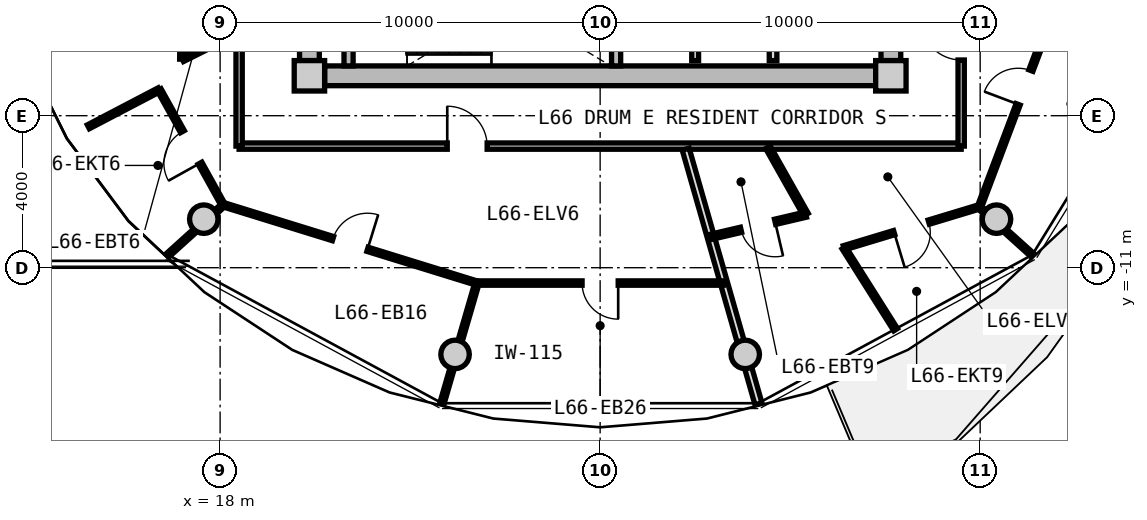
"""IFC4 building model, lengths in metres.
Left out: names, types, materials, properties, quantities, classifications, styles, units other than length and angle.
Written with IfcOpenShell. Run it as: python <this file> out.ifc"""

import sys

from ifc_helpers import new_model, si_unit, direction, frame, frame_2d, origin, origin_2d, place, context, subcontext, project, spatial, rectangle, circle, extrude, source, transform, mapped, element, fill, save


model = new_model("IFC4")
c1 = context("Model", 3, precision=1e-05, world=origin(), true_north=direction((0.0, 1.0)))
c2 = subcontext(c1, "Body", "Model", "MODEL_VIEW")
j1 = project(units=[si_unit("LENGTHUNIT", "METRE"), si_unit("PLANEANGLEUNIT", "RADIAN")], contexts=[c1])
p1 = place(None, origin())
s1 = spatial("IfcSite", under=j1, at=p1, CompositionType="ELEMENT")
p2 = place(p1, origin())
s2 = spatial("IfcBuilding", under=s1, at=p2, CompositionType="ELEMENT")
p3 = place(p2, frame((0.0, 0.0, 213.9)))
s3 = spatial("IfcBuildingStorey", under=s2, at=p3, CompositionType="ELEMENT", Elevation=213.9)
m1 = source(origin(), c2, "Body", "SweptSolid", [
    extrude(rectangle(XDim=0.8, YDim=0.8, at=origin_2d()), origin(), (0.0, 0.0, 1.0), 3.05),
])
for number, where, z_axis, x_axis in (
    (1, (20.35, -5.95, 0.0), (0.0, 0.0, 1.0), (1.0, 0.0, 0.0)),
    (2, (35.65, -5.95, 0.0), (0.0, 0.0, 1.0), (1.0, 0.0, 0.0)),
):
    element("IfcColumn", number, at=place(p3, frame(where, z_axis=z_axis, x_axis=x_axis)), inside=s3, PredefinedType="COLUMN", context=c2, shape_type="MappedRepresentation", body=[
        mapped(m1, transform((0.0, 0.0, 0.0), x_axis=(1.0, 0.0, 0.0), y_axis=(0.0, 1.0, 0.0), z_axis=(0.0, 0.0, 1.0), scale=1.0)),
    ])
m2 = source(origin(), c2, "Body", "SweptSolid", [
    extrude(rectangle(XDim=14.5, YDim=0.52, at=frame_2d((7.25, 0.0))), origin(), (0.0, 0.0, 1.0), 2.76),
])
p4 = place(p3, frame((35.25, -5.95, 0.0), z_axis=(0.0, 0.0, 1.0), x_axis=(-1.0, 0.0, 0.0)))
e3 = element("IfcWall", 3, at=p4, inside=s3, PredefinedType="SHEAR", context=c2, shape_type="MappedRepresentation", body=[
    mapped(m2, transform((0.0, 0.0, 0.0), x_axis=(1.0, 0.0, 0.0), y_axis=(0.0, 1.0, 0.0), z_axis=(0.0, 0.0, 1.0), scale=1.0)),
])
m3 = source(origin(), c2, "Body", "SweptSolid", [
    extrude(rectangle(XDim=11.1, YDim=0.52, at=frame_2d((5.55, 0.0))), origin(), (0.0, 0.0, 1.0), 2.76),
])
p5 = place(p3, frame((20.35, -5.55, 0.0), z_axis=(0.0, 0.0, 1.0), x_axis=(0.0, 1.0, 0.0)))
e4 = element("IfcWall", 4, at=p5, inside=s3, PredefinedType="SHEAR", context=c2, shape_type="MappedRepresentation", body=[
    mapped(m3, transform((0.0, 0.0, 0.0), x_axis=(1.0, 0.0, 0.0), y_axis=(0.0, 1.0, 0.0), z_axis=(0.0, 0.0, 1.0), scale=1.0)),
])
p6 = place(p5, frame((3.8, 0.0, 0.0)))
e5 = element("IfcOpeningElement", 5, at=p6, cuts=e4, PredefinedType="OPENING", context=c2, shape_type="SweptSolid", body=[
    extrude(rectangle(XDim=1.2, YDim=2.15, at=frame_2d((0.6, 1.075))), frame((0.0, 0.27, 0.0), z_axis=(0.0, -1.0, 0.0), x_axis=(1.0, 0.0, 0.0)), (0.0, 0.0, 1.0), 0.54),
])
p7 = place(p3, frame((35.65, 5.55, 0.0), z_axis=(0.0, 0.0, 1.0), x_axis=(0.0, -1.0, 0.0)))
e6 = element("IfcWall", 6, at=p7, inside=s3, PredefinedType="SHEAR", context=c2, shape_type="MappedRepresentation", body=[
    mapped(m3, transform((0.0, 0.0, 0.0), x_axis=(1.0, 0.0, 0.0), y_axis=(0.0, 1.0, 0.0), z_axis=(0.0, 0.0, 1.0), scale=1.0)),
])
p8 = place(p7, frame((5.65, 0.0, 0.0)))
e7 = element("IfcOpeningElement", 7, at=p8, cuts=e6, PredefinedType="OPENING", context=c2, shape_type="SweptSolid", body=[
    extrude(rectangle(XDim=1.2, YDim=2.15, at=frame_2d((0.6, 1.075))), frame((0.0, 0.27, 0.0), z_axis=(0.0, -1.0, 0.0), x_axis=(1.0, 0.0, 0.0)), (0.0, 0.0, 1.0), 0.54),
])
m4 = source(origin(), c2, "Body", "SweptSolid", [
    extrude(circle(Radius=0.375, at=origin_2d()), origin(), (0.0, 0.0, 1.0), 3.05),
])
for number, where, z_axis, x_axis in (
    (8, (17.57, -9.723, 0.0), (0.0, 0.0, 1.0), (1.0, 0.0, 0.0)),
    (9, (24.182, -13.281, 0.0), (0.0, 0.0, 1.0), (1.0, 0.0, 0.0)),
    (10, (31.818, -13.281, 0.0), (0.0, 0.0, 1.0), (1.0, 0.0, 0.0)),
    (11, (38.43, -9.723, 0.0), (0.0, 0.0, 1.0), (1.0, 0.0, 0.0)),
):
    element("IfcColumn", number, at=place(p3, frame(where, z_axis=z_axis, x_axis=x_axis)), inside=s3, PredefinedType="COLUMN", context=c2, shape_type="MappedRepresentation", body=[
        mapped(m4, transform((0.0, 0.0, 0.0), x_axis=(1.0, 0.0, 0.0), y_axis=(0.0, 1.0, 0.0), z_axis=(0.0, 0.0, 1.0), scale=1.0)),
    ])
m5 = source(origin(), c2, "Body", "SweptSolid", [
    extrude(rectangle(XDim=3.24, YDim=0.24, at=frame_2d((1.62, 0.0))), origin(), (0.0, 0.0, 1.0), 2.76),
])
for number, where, z_axis, x_axis in (
    (12, (21.38, -5.69, 0.0), (0.0, 0.0, 1.0), (0.0, 1.0, 0.0)),
    (13, (28.42, -5.69, 0.0), (0.0, 0.0, 1.0), (0.0, 1.0, 0.0)),
):
    element("IfcWall", number, at=place(p3, frame(where, z_axis=z_axis, x_axis=x_axis)), inside=s3, PredefinedType="PARTITIONING", context=c2, shape_type="MappedRepresentation", body=[
        mapped(m5, transform((0.0, 0.0, 0.0), x_axis=(1.0, 0.0, 0.0), y_axis=(0.0, 1.0, 0.0), z_axis=(0.0, 0.0, 1.0), scale=1.0)),
    ])
m6 = source(origin(), c2, "Body", "SweptSolid", [
    extrude(rectangle(XDim=3.8, YDim=0.2, at=frame_2d((1.9, 0.0))), origin(), (0.0, 0.0, 1.0), 2.745),
])
p9 = place(p3, frame((32.55, -5.55, 0.0), z_axis=(0.0, 0.0, 1.0), x_axis=(0.0, 1.0, 0.0)))
e14 = element("IfcWall", 14, at=p9, inside=s3, PredefinedType="PARTITIONING", context=c2, shape_type="MappedRepresentation", body=[
    mapped(m6, transform((0.0, 0.0, 0.0), x_axis=(1.0, 0.0, 0.0), y_axis=(0.0, 1.0, 0.0), z_axis=(0.0, 0.0, 1.0), scale=1.0)),
])
m7 = source(origin(), c2, "Body", "SweptSolid", [
    extrude(rectangle(XDim=4.2, YDim=0.18, at=frame_2d((2.1, 0.0))), origin(), (0.0, 0.0, 1.0), 2.745),
])
p10 = place(p3, frame((30.5, -5.55, 0.0), z_axis=(0.0, 0.0, 1.0), x_axis=(0.0, 1.0, 0.0)))
e15 = element("IfcWall", 15, at=p10, inside=s3, PredefinedType="PARTITIONING", context=c2, shape_type="MappedRepresentation", body=[
    mapped(m7, transform((0.0, 0.0, 0.0), x_axis=(1.0, 0.0, 0.0), y_axis=(0.0, 1.0, 0.0), z_axis=(0.0, 0.0, 1.0), scale=1.0)),
])
m8 = source(origin(), c2, "Body", "SweptSolid", [
    extrude(rectangle(XDim=19.0, YDim=0.165, at=frame_2d((9.5, 0.0))), origin(), (0.0, 0.0, 1.0), 2.745),
])
p11 = place(p3, frame((37.5, -7.8, 0.0), z_axis=(0.0, 0.0, 1.0), x_axis=(-1.0, 0.0, 0.0)))
e16 = element("IfcWall", 16, at=p11, inside=s3, PredefinedType="PARTITIONING", context=c2, shape_type="MappedRepresentation", body=[
    mapped(m8, transform((0.0, 0.0, 0.0), x_axis=(1.0, 0.0, 0.0), y_axis=(0.0, 1.0, 0.0), z_axis=(0.0, 0.0, 1.0), scale=1.0)),
])
p12 = place(p11, frame((12.473, 0.0, 0.0)))
e17 = element("IfcOpeningElement", 17, at=p12, cuts=e16, PredefinedType="OPENING", context=c2, shape_type="SweptSolid", body=[
    extrude(rectangle(XDim=1.05, YDim=2.15, at=frame_2d((0.525, 1.075))), frame((0.0, 0.093, 0.0), z_axis=(0.0, -1.0, 0.0), x_axis=(1.0, 0.0, 0.0)), (0.0, 0.0, 1.0), 0.185),
])
m9 = source(origin(), c2, "Body", "SweptSolid", [
    extrude(rectangle(XDim=6.88, YDim=0.165, at=frame_2d((3.44, 0.0))), origin(), (0.0, 0.0, 1.0), 2.745),
])
p13 = place(p3, frame((18.5, -7.8, 0.0), z_axis=(0.0, 0.0, 1.0), x_axis=(0.0, 1.0, 0.0)))
e18 = element("IfcWall", 18, at=p13, inside=s3, PredefinedType="PARTITIONING", context=c2, shape_type="MappedRepresentation", body=[
    mapped(m9, transform((0.0, 0.0, 0.0), x_axis=(1.0, 0.0, 0.0), y_axis=(0.0, 1.0, 0.0), z_axis=(0.0, 0.0, 1.0), scale=1.0)),
])
p14 = place(p3, frame((37.5, -0.92, 0.0), z_axis=(0.0, 0.0, 1.0), x_axis=(0.0, -1.0, 0.0)))
e19 = element("IfcWall", 19, at=p14, inside=s3, PredefinedType="PARTITIONING", context=c2, shape_type="MappedRepresentation", body=[
    mapped(m9, transform((0.0, 0.0, 0.0), x_axis=(1.0, 0.0, 0.0), y_axis=(0.0, 1.0, 0.0), z_axis=(0.0, 0.0, 1.0), scale=1.0)),
])
p15 = place(p14, frame((3.564, 0.0, 0.0)))
e20 = element("IfcOpeningElement", 20, at=p15, cuts=e19, PredefinedType="OPENING", context=c2, shape_type="SweptSolid", body=[
    extrude(rectangle(XDim=1.05, YDim=2.15, at=frame_2d((0.525, 1.075))), frame((0.0, 0.093, 0.0), z_axis=(0.0, -1.0, 0.0), x_axis=(1.0, 0.0, 0.0)), (0.0, 0.0, 1.0), 0.185),
])
m10 = source(origin(), c2, "Body", "SweptSolid", [
    extrude(rectangle(XDim=6.974, YDim=0.19, at=frame_2d((3.487, 0.0))), origin(), (0.0, 0.0, 1.0), 2.345),
])
p16 = place(p3, frame((30.251, -7.88, 0.0), z_axis=(0.0, 0.0, 1.0), x_axis=(0.274707256801, -0.961527910703, 0.0)))
e21 = element("IfcWall", 21, at=p16, inside=s3, PredefinedType="PARTITIONING", context=c2, shape_type="MappedRepresentation", body=[
    mapped(m10, transform((0.0, 0.0, 0.0), x_axis=(1.0, 0.0, 0.0), y_axis=(0.0, 1.0, 0.0), z_axis=(0.0, 0.0, 1.0), scale=1.0)),
])
m11 = source(origin(), c2, "Body", "SweptSolid", [
    extrude(rectangle(XDim=6.98, YDim=0.115, at=frame_2d((3.49, 0.0))), origin(), (0.0, 0.0, 1.0), 2.745),
])
p17 = place(p3, frame((18.091, -9.344, 0.0), z_axis=(0.0, 0.0, 1.0), x_axis=(0.955342331637, -0.295501318749, 0.0)))
e22 = element("IfcWall", 22, at=p17, inside=s3, PredefinedType="PARTITIONING", context=c2, shape_type="MappedRepresentation", body=[
    mapped(m11, transform((0.0, 0.0, 0.0), x_axis=(1.0, 0.0, 0.0), y_axis=(0.0, 1.0, 0.0), z_axis=(0.0, 0.0, 1.0), scale=1.0)),
])
p18 = place(p17, frame((3.015, 0.0, 0.0)))
e23 = element("IfcOpeningElement", 23, at=p18, cuts=e22, PredefinedType="OPENING", context=c2, shape_type="SweptSolid", body=[
    extrude(rectangle(XDim=0.95, YDim=2.1, at=frame_2d((0.475, 1.05))), frame((0.0, 0.067, 0.0), z_axis=(0.0, -1.0, 0.0), x_axis=(1.0, 0.0, 0.0)), (0.0, 0.0, 1.0), 0.135),
])
m12 = source(origin(), c2, "Body", "SweptSolid", [
    extrude(rectangle(XDim=1.988, YDim=0.115, at=frame_2d((0.994, 0.0))), origin(), (0.0, 0.0, 1.0), 2.345),
])
p19 = place(p3, frame((18.091, -9.344, 0.0), z_axis=(0.0, 0.0, 1.0), x_axis=(-0.741992301729, -0.670408401033, 0.0)))
e24 = element("IfcWall", 24, at=p19, inside=s3, PredefinedType="PARTITIONING", context=c2, shape_type="MappedRepresentation", body=[
    mapped(m12, transform((0.0, 0.0, 0.0), x_axis=(1.0, 0.0, 0.0), y_axis=(0.0, 1.0, 0.0), z_axis=(0.0, 0.0, 1.0), scale=1.0)),
])
m13 = source(origin(), c2, "Body", "SweptSolid", [
    extrude(rectangle(XDim=6.481, YDim=0.115, at=frame_2d((3.24, 0.0))), origin(), (0.0, 0.0, 1.0), 2.745),
])
p20 = place(p3, frame((24.76, -11.404, 0.0), z_axis=(0.0, 0.0, 1.0), x_axis=(1.0, 0.0, 0.0)))
e25 = element("IfcWall", 25, at=p20, inside=s3, PredefinedType="PARTITIONING", context=c2, shape_type="MappedRepresentation", body=[
    mapped(m13, transform((0.0, 0.0, 0.0), x_axis=(1.0, 0.0, 0.0), y_axis=(0.0, 1.0, 0.0), z_axis=(0.0, 0.0, 1.0), scale=1.0)),
])
p21 = place(p20, frame((2.765, 0.0, 0.0)))
e26 = element("IfcOpeningElement", 26, at=p21, cuts=e25, PredefinedType="OPENING", context=c2, shape_type="SweptSolid", body=[
    extrude(rectangle(XDim=0.95, YDim=2.1, at=frame_2d((0.475, 1.05))), frame((0.0, 0.067, 0.0), z_axis=(0.0, -1.0, 0.0), x_axis=(1.0, 0.0, 0.0)), (0.0, 0.0, 1.0), 0.135),
])
m14 = source(origin(), c2, "Body", "SweptSolid", [
    extrude(rectangle(XDim=3.313, YDim=0.115, at=frame_2d((1.657, 0.0))), origin(), (0.0, 0.0, 1.0), 2.345),
])
p22 = place(p3, frame((24.76, -11.404, 0.0), z_axis=(0.0, 0.0, 1.0), x_axis=(-0.279612365916, -0.960112975033, 0.0)))
e27 = element("IfcWall", 27, at=p22, inside=s3, PredefinedType="PARTITIONING", context=c2, shape_type="MappedRepresentation", body=[
    mapped(m14, transform((0.0, 0.0, 0.0), x_axis=(1.0, 0.0, 0.0), y_axis=(0.0, 1.0, 0.0), z_axis=(0.0, 0.0, 1.0), scale=1.0)),
])
m15 = source(origin(), c2, "Body", "SweptSolid", [
    extrude(rectangle(XDim=1.638, YDim=0.14, at=frame_2d((0.819, 0.0))), origin(), (0.0, 0.0, 1.0), 2.745),
])
p23 = place(p3, frame((18.47, -4.778, 0.0), z_axis=(0.0, 0.0, 1.0), x_axis=(-0.893919977945, -0.448226586707, 0.0)))
e28 = element("IfcWall", 28, at=p23, inside=s3, PredefinedType="PARTITIONING", context=c2, shape_type="MappedRepresentation", body=[
    mapped(m15, transform((0.0, 0.0, 0.0), x_axis=(1.0, 0.0, 0.0), y_axis=(0.0, 1.0, 0.0), z_axis=(0.0, 0.0, 1.0), scale=1.0)),
])
m16 = source(origin(), c2, "Body", "SweptSolid", [
    extrude(rectangle(XDim=2.759, YDim=0.14, at=frame_2d((1.379, 0.0))), origin(), (0.0, 0.0, 1.0), 2.745),
])
p24 = place(p3, frame((17.005, -5.513, 0.0), z_axis=(0.0, 0.0, 1.0), x_axis=(0.01194710728, 0.999928630767, 0.0)))
e29 = element("IfcWall", 29, at=p24, inside=s3, PredefinedType="PARTITIONING", context=c2, shape_type="MappedRepresentation", body=[
    mapped(m16, transform((0.0, 0.0, 0.0), x_axis=(1.0, 0.0, 0.0), y_axis=(0.0, 1.0, 0.0), z_axis=(0.0, 0.0, 1.0), scale=1.0)),
])
p25 = place(p24, frame((0.919, 0.0, 0.0)))
e30 = element("IfcOpeningElement", 30, at=p25, cuts=e29, PredefinedType="OPENING", context=c2, shape_type="SweptSolid", body=[
    extrude(rectangle(XDim=0.92, YDim=2.1, at=frame_2d((0.46, 1.05))), frame((0.0, 0.08, 0.0), z_axis=(0.0, -1.0, 0.0), x_axis=(1.0, 0.0, 0.0)), (0.0, 0.0, 1.0), 0.16),
])
m17 = source(origin(), c2, "Body", "SweptSolid", [
    extrude(rectangle(XDim=2.104, YDim=0.115, at=frame_2d((1.052, 0.0))), origin(), (0.0, 0.0, 1.0), 2.745),
])
p26 = place(p3, frame((16.396, -6.317, 0.0), z_axis=(0.0, 0.0, 1.0), x_axis=(-0.886060817493, -0.463569010724, 0.0)))
e31 = element("IfcWall", 31, at=p26, inside=s3, PredefinedType="PARTITIONING", context=c2, shape_type="MappedRepresentation", body=[
    mapped(m17, transform((0.0, 0.0, 0.0), x_axis=(1.0, 0.0, 0.0), y_axis=(0.0, 1.0, 0.0), z_axis=(0.0, 0.0, 1.0), scale=1.0)),
])
m18 = source(origin(), c2, "Body", "SweptSolid", [
    extrude(rectangle(XDim=3.472, YDim=0.115, at=frame_2d((1.736, 0.0))), origin(), (0.0, 0.0, 1.0), 2.745),
])
p27 = place(p3, frame((16.396, -6.317, 0.0), z_axis=(0.0, 0.0, 1.0), x_axis=(0.485804139346, -0.874067696574, 0.0)))
e32 = element("IfcWall", 32, at=p27, inside=s3, PredefinedType="PARTITIONING", context=c2, shape_type="MappedRepresentation", body=[
    mapped(m18, transform((0.0, 0.0, 0.0), x_axis=(1.0, 0.0, 0.0), y_axis=(0.0, 1.0, 0.0), z_axis=(0.0, 0.0, 1.0), scale=1.0)),
])
p28 = place(p27, frame((1.261, 0.0, 0.0)))
e33 = element("IfcOpeningElement", 33, at=p28, cuts=e32, PredefinedType="OPENING", context=c2, shape_type="SweptSolid", body=[
    extrude(rectangle(XDim=0.95, YDim=2.1, at=frame_2d((0.475, 1.05))), frame((0.0, 0.067, 0.0), z_axis=(0.0, -1.0, 0.0), x_axis=(1.0, 0.0, 0.0)), (0.0, 0.0, 1.0), 0.135),
])
m19 = source(origin(), c2, "Body", "SweptSolid", [
    extrude(rectangle(XDim=6.738, YDim=0.115, at=frame_2d((3.369, 0.0))), origin(), (0.0, 0.0, 1.0), 2.745),
])
p29 = place(p3, frame((37.978, -9.409, 0.0), z_axis=(0.0, 0.0, 1.0), x_axis=(0.352945344347, 0.935643940772, 0.0)))
e34 = element("IfcWall", 34, at=p29, inside=s3, PredefinedType="PARTITIONING", context=c2, shape_type="MappedRepresentation", body=[
    mapped(m19, transform((0.0, 0.0, 0.0), x_axis=(1.0, 0.0, 0.0), y_axis=(0.0, 1.0, 0.0), z_axis=(0.0, 0.0, 1.0), scale=1.0)),
])
p30 = place(p29, frame((2.894, 0.0, 0.0)))
e35 = element("IfcOpeningElement", 35, at=p30, cuts=e34, PredefinedType="OPENING", context=c2, shape_type="SweptSolid", body=[
    extrude(rectangle(XDim=0.95, YDim=2.1, at=frame_2d((0.475, 1.05))), frame((0.0, 0.067, 0.0), z_axis=(0.0, -1.0, 0.0), x_axis=(1.0, 0.0, 0.0)), (0.0, 0.0, 1.0), 0.135),
])
m20 = source(origin(), c2, "Body", "SweptSolid", [
    extrude(rectangle(XDim=1.894, YDim=0.115, at=frame_2d((0.947, 0.0))), origin(), (0.0, 0.0, 1.0), 2.345),
])
p31 = place(p3, frame((37.978, -9.409, 0.0), z_axis=(0.0, 0.0, 1.0), x_axis=(0.742704207382, -0.669619638554, 0.0)))
e36 = element("IfcWall", 36, at=p31, inside=s3, PredefinedType="PARTITIONING", context=c2, shape_type="MappedRepresentation", body=[
    mapped(m20, transform((0.0, 0.0, 0.0), x_axis=(1.0, 0.0, 0.0), y_axis=(0.0, 1.0, 0.0), z_axis=(0.0, 0.0, 1.0), scale=1.0)),
])
m21 = source(origin(), c2, "Body", "SweptSolid", [
    extrude(rectangle(XDim=2.035, YDim=0.14, at=frame_2d((1.018, 0.0))), origin(), (0.0, 0.0, 1.0), 2.745),
])
p32 = place(p3, frame((32.415, -7.83, 0.0), z_axis=(0.0, 0.0, 1.0), x_axis=(0.491092509169, -0.871107425888, 0.0)))
e37 = element("IfcWall", 37, at=p32, inside=s3, PredefinedType="PARTITIONING", context=c2, shape_type="MappedRepresentation", body=[
    mapped(m21, transform((0.0, 0.0, 0.0), x_axis=(1.0, 0.0, 0.0), y_axis=(0.0, 1.0, 0.0), z_axis=(0.0, 0.0, 1.0), scale=1.0)),
])
m22 = source(origin(), c2, "Body", "SweptSolid", [
    extrude(rectangle(XDim=2.586, YDim=0.14, at=frame_2d((1.293, 0.0))), origin(), (0.0, 0.0, 1.0), 2.745),
])
p33 = place(p3, frame((33.415, -9.603, 0.0), z_axis=(0.0, 0.0, 1.0), x_axis=(-0.973691298219, -0.227871138526, 0.0)))
e38 = element("IfcWall", 38, at=p33, inside=s3, PredefinedType="PARTITIONING", context=c2, shape_type="MappedRepresentation", body=[
    mapped(m22, transform((0.0, 0.0, 0.0), x_axis=(1.0, 0.0, 0.0), y_axis=(0.0, 1.0, 0.0), z_axis=(0.0, 0.0, 1.0), scale=1.0)),
])
p34 = place(p33, frame((0.833, 0.0, 0.0)))
e39 = element("IfcOpeningElement", 39, at=p34, cuts=e38, PredefinedType="OPENING", context=c2, shape_type="SweptSolid", body=[
    extrude(rectangle(XDim=0.92, YDim=2.1, at=frame_2d((0.46, 1.05))), frame((0.0, 0.08, 0.0), z_axis=(0.0, -1.0, 0.0), x_axis=(1.0, 0.0, 0.0)), (0.0, 0.0, 1.0), 0.16),
])
m23 = source(origin(), c2, "Body", "SweptSolid", [
    extrude(rectangle(XDim=2.549, YDim=0.115, at=frame_2d((1.274, 0.0))), origin(), (0.0, 0.0, 1.0), 2.745),
])
p35 = place(p3, frame((34.414, -10.477, 0.0), z_axis=(0.0, 0.0, 1.0), x_axis=(0.534108310175, -0.845416059111, 0.0)))
e40 = element("IfcWall", 40, at=p35, inside=s3, PredefinedType="PARTITIONING", context=c2, shape_type="MappedRepresentation", body=[
    mapped(m23, transform((0.0, 0.0, 0.0), x_axis=(1.0, 0.0, 0.0), y_axis=(0.0, 1.0, 0.0), z_axis=(0.0, 0.0, 1.0), scale=1.0)),
])
m24 = source(origin(), c2, "Body", "SweptSolid", [
    extrude(rectangle(XDim=3.714, YDim=0.115, at=frame_2d((1.857, 0.0))), origin(), (0.0, 0.0, 1.0), 2.745),
])
p36 = place(p3, frame((34.414, -10.477, 0.0), z_axis=(0.0, 0.0, 1.0), x_axis=(0.957188983281, 0.28946372879, 0.0)))
e41 = element("IfcWall", 41, at=p36, inside=s3, PredefinedType="PARTITIONING", context=c2, shape_type="MappedRepresentation", body=[
    mapped(m24, transform((0.0, 0.0, 0.0), x_axis=(1.0, 0.0, 0.0), y_axis=(0.0, 1.0, 0.0), z_axis=(0.0, 0.0, 1.0), scale=1.0)),
])
p37 = place(p36, frame((1.382, 0.0, 0.0)))
e42 = element("IfcOpeningElement", 42, at=p37, cuts=e41, PredefinedType="OPENING", context=c2, shape_type="SweptSolid", body=[
    extrude(rectangle(XDim=0.95, YDim=2.1, at=frame_2d((0.475, 1.05))), frame((0.0, 0.067, 0.0), z_axis=(0.0, -1.0, 0.0), x_axis=(1.0, 0.0, 0.0)), (0.0, 0.0, 1.0), 0.135),
])
m25 = source(origin(), c2, "Body", "SweptSolid", [
    extrude(rectangle(XDim=1.05, YDim=2.15, at=frame_2d((0.525, 1.075))), frame((0.0, 0.025, 0.0), z_axis=(0.0, -1.0, 0.0), x_axis=(1.0, 0.0, 0.0)), (0.0, 0.0, 1.0), 0.05),
])
p38 = place(p12, frame((1.05, 0.0, 0.0), z_axis=(0.0, 0.0, 1.0), x_axis=(-1.0, 0.0, 0.0)))
e43 = element("IfcDoor", 43, at=p38, inside=s3, OperationType="SINGLE_SWING_LEFT", PredefinedType="DOOR", context=c2, shape_type="MappedRepresentation", body=[
    mapped(m25, transform((0.0, 0.0, 0.0), x_axis=(1.0, 0.0, 0.0), y_axis=(0.0, 1.0, 0.0), z_axis=(0.0, 0.0, 1.0), scale=1.0)),
])
fill(e17, e43)
m26 = source(origin(), c2, "Body", "SweptSolid", [
    extrude(rectangle(XDim=0.95, YDim=2.1, at=frame_2d((0.475, 1.05))), frame((0.0, 0.025, 0.0), z_axis=(0.0, -1.0, 0.0), x_axis=(1.0, 0.0, 0.0)), (0.0, 0.0, 1.0), 0.05),
])
p39 = place(p28, frame((0.95, 0.0, 0.0), z_axis=(0.0, 0.0, 1.0), x_axis=(-1.0, 0.0, 0.0)))
e44 = element("IfcDoor", 44, at=p39, inside=s3, OperationType="SINGLE_SWING_LEFT", PredefinedType="DOOR", context=c2, shape_type="MappedRepresentation", body=[
    mapped(m26, transform((0.0, 0.0, 0.0), x_axis=(1.0, 0.0, 0.0), y_axis=(0.0, 1.0, 0.0), z_axis=(0.0, 0.0, 1.0), scale=1.0)),
])
fill(e33, e44)
p40 = place(p18, origin())
e45 = element("IfcDoor", 45, at=p40, inside=s3, OperationType="SINGLE_SWING_RIGHT", PredefinedType="DOOR", context=c2, shape_type="MappedRepresentation", body=[
    mapped(m26, transform((0.0, 0.0, 0.0), x_axis=(1.0, 0.0, 0.0), y_axis=(0.0, 1.0, 0.0), z_axis=(0.0, 0.0, 1.0), scale=1.0)),
])
fill(e23, e45)
p41 = place(p21, frame((0.95, 0.0, 0.0), z_axis=(0.0, 0.0, 1.0), x_axis=(-1.0, 0.0, 0.0)))
e46 = element("IfcDoor", 46, at=p41, inside=s3, OperationType="SINGLE_SWING_LEFT", PredefinedType="DOOR", context=c2, shape_type="MappedRepresentation", body=[
    mapped(m26, transform((0.0, 0.0, 0.0), x_axis=(1.0, 0.0, 0.0), y_axis=(0.0, 1.0, 0.0), z_axis=(0.0, 0.0, 1.0), scale=1.0)),
])
fill(e26, e46)
p42 = place(p15, frame((1.05, 0.0, 0.0), z_axis=(0.0, 0.0, 1.0), x_axis=(-1.0, 0.0, 0.0)))
e47 = element("IfcDoor", 47, at=p42, inside=s3, OperationType="SINGLE_SWING_RIGHT", PredefinedType="DOOR", context=c2, shape_type="MappedRepresentation", body=[
    mapped(m25, transform((0.0, 0.0, 0.0), x_axis=(1.0, 0.0, 0.0), y_axis=(0.0, 1.0, 0.0), z_axis=(0.0, 0.0, 1.0), scale=1.0)),
])
fill(e20, e47)
m27 = source(origin(), c2, "Body", "SweptSolid", [
    extrude(rectangle(XDim=0.92, YDim=2.1, at=frame_2d((0.46, 1.05))), frame((0.0, 0.025, 0.0), z_axis=(0.0, -1.0, 0.0), x_axis=(1.0, 0.0, 0.0)), (0.0, 0.0, 1.0), 0.05),
])
p43 = place(p34, origin())
e48 = element("IfcDoor", 48, at=p43, inside=s3, OperationType="SINGLE_SWING_LEFT", PredefinedType="DOOR", context=c2, shape_type="MappedRepresentation", body=[
    mapped(m27, transform((0.0, 0.0, 0.0), x_axis=(1.0, 0.0, 0.0), y_axis=(0.0, 1.0, 0.0), z_axis=(0.0, 0.0, 1.0), scale=1.0)),
])
fill(e39, e48)
p44 = place(p37, frame((0.95, 0.0, 0.0), z_axis=(0.0, 0.0, 1.0), x_axis=(-1.0, 0.0, 0.0)))
e49 = element("IfcDoor", 49, at=p44, inside=s3, OperationType="SINGLE_SWING_RIGHT", PredefinedType="DOOR", context=c2, shape_type="MappedRepresentation", body=[
    mapped(m26, transform((0.0, 0.0, 0.0), x_axis=(1.0, 0.0, 0.0), y_axis=(0.0, 1.0, 0.0), z_axis=(0.0, 0.0, 1.0), scale=1.0)),
])
fill(e42, e49)
p45 = place(p30, origin())
e50 = element("IfcDoor", 50, at=p45, inside=s3, OperationType="SINGLE_SWING_LEFT", PredefinedType="DOOR", context=c2, shape_type="MappedRepresentation", body=[
    mapped(m26, transform((0.0, 0.0, 0.0), x_axis=(1.0, 0.0, 0.0), y_axis=(0.0, 1.0, 0.0), z_axis=(0.0, 0.0, 1.0), scale=1.0)),
])
fill(e35, e50)
save(model, sys.argv[1])
